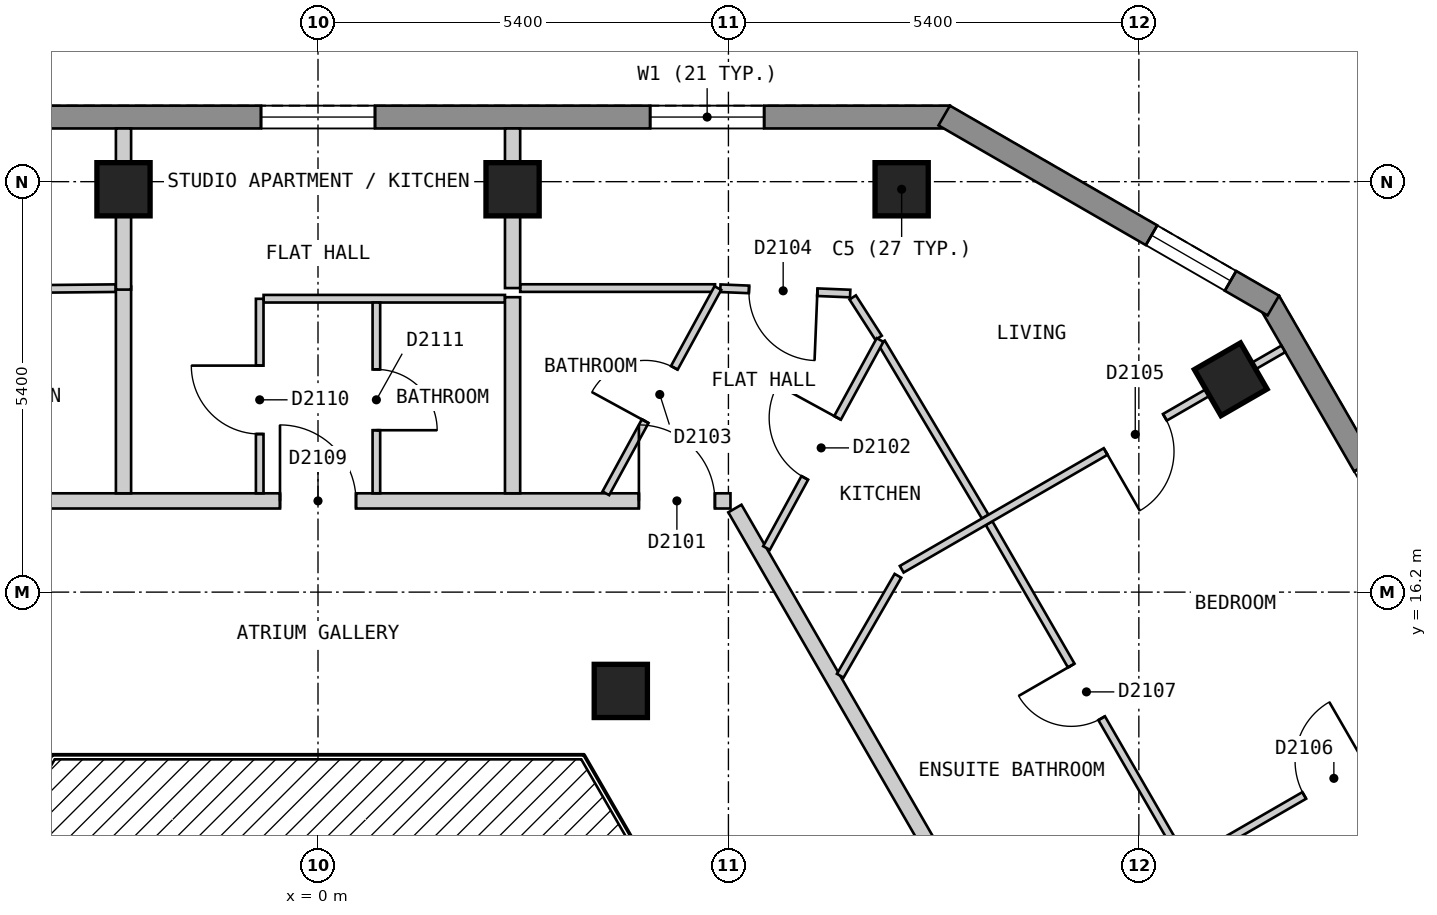
"""IFC4 building model, lengths in metres.
Left out: names, types, materials, properties, quantities, classifications, styles, units other than length and angle.
Written with IfcOpenShell. Run it as: python <this file> out.ifc"""

import sys

from ifc_helpers import new_model, si_unit, direction, frame, frame_2d, origin, origin_2d, place, context, subcontext, project, spatial, polyline, rectangle, outline, extrude, element, fill, save


model = new_model("IFC4")
c1 = context("Model", 3, precision=1e-05, world=origin(), true_north=direction((0.0, 1.0)))
c2 = subcontext(c1, "Body", "Model", "MODEL_VIEW")
j1 = project(units=[si_unit("LENGTHUNIT", "METRE"), si_unit("PLANEANGLEUNIT", "RADIAN")], contexts=[c1])
p1 = place(None, origin())
s1 = spatial("IfcSite", under=j1, at=p1, CompositionType="ELEMENT")
p2 = place(p1, origin())
s2 = spatial("IfcBuilding", under=s1, at=p2, CompositionType="ELEMENT")
p3 = place(p2, frame((0.0, 0.0, 217.8)))
s3 = spatial("IfcBuildingStorey", under=s2, at=p3, CompositionType="ELEMENT", Elevation=217.8)
for number, where, z_axis, x_axis in (
    (1, (7.679, 21.5, 0.0), (0.0, 0.0, 1.0), (-1.0, 0.0, 0.0)),
    (2, (2.56, 21.5, 0.0), (0.0, 0.0, 1.0), (-1.0, 0.0, 0.0)),
    (3, (-2.559, 21.5, 0.0), (0.0, 0.0, 1.0), (-1.0, 0.0, 0.0)),
    (4, (12.009, 19.0, 0.0), (0.0, 0.0, 1.0), (-0.5, 0.866, 0.0)),
    (5, (3.984, 14.9, 0.0), (0.0, 0.0, 1.0), (1.0, 0.0, 0.0)),
):
    element("IfcColumn", number, at=place(p3, frame(where, z_axis=z_axis, x_axis=x_axis)), inside=s3, PredefinedType="COLUMN", context=c2, shape_type="SweptSolid", body=[
        extrude(rectangle(XDim=0.7, YDim=0.7, at=origin_2d()), origin(), (0.0, 0.0, 1.0), 3.0),
    ])
p4 = place(p3, frame((8.314, 22.45, 0.0), z_axis=(0.0, 0.0, 1.0), x_axis=(-1.0, 0.0, 0.0)))
e6 = element("IfcWall", 6, at=p4, inside=s3, PredefinedType="SOLIDWALL", context=c2, shape_type="SweptSolid", body=[
    extrude(outline(polyline([(0.0, -0.15), (16.628, -0.15), (16.548, 0.15), (0.08, 0.15), (0.0, -0.15)])), origin(), (0.0, 0.0, 1.0), 2.7),
])
p5 = place(p4, frame((2.444, 0.0, 0.15)))
e7 = element("IfcOpeningElement", 7, at=p5, cuts=e6, PredefinedType="OPENING", context=c2, shape_type="SweptSolid", body=[
    extrude(rectangle(XDim=1.5, YDim=2.1, at=frame_2d((0.75, 1.05))), frame((0.0, 0.16, 0.0), z_axis=(0.0, -1.0, 0.0), x_axis=(1.0, 0.0, 0.0)), (0.0, 0.0, 1.0), 0.32),
])
p6 = place(p4, frame((7.564, 0.0, 0.15)))
e8 = element("IfcOpeningElement", 8, at=p6, cuts=e6, PredefinedType="OPENING", context=c2, shape_type="SweptSolid", body=[
    extrude(rectangle(XDim=1.5, YDim=2.1, at=frame_2d((0.75, 1.05))), frame((0.0, 0.16, 0.0), z_axis=(0.0, -1.0, 0.0), x_axis=(1.0, 0.0, 0.0)), (0.0, 0.0, 1.0), 0.32),
])
p7 = place(p4, frame((12.683, 0.0, 0.15)))
e9 = element("IfcOpeningElement", 9, at=p7, cuts=e6, PredefinedType="OPENING", context=c2, shape_type="SweptSolid", body=[
    extrude(rectangle(XDim=1.5, YDim=2.1, at=frame_2d((0.75, 1.05))), frame((0.0, 0.16, 0.0), z_axis=(0.0, -1.0, 0.0), x_axis=(1.0, 0.0, 0.0)), (0.0, 0.0, 1.0), 0.32),
])
p8 = place(p3, frame((23.599, 0.825, 0.0), z_axis=(0.0, 0.0, 1.0), x_axis=(-0.500003656944, 0.866023292436, 0.0)))
e10 = element("IfcWall", 10, at=p8, inside=s3, PredefinedType="SOLIDWALL", context=c2, shape_type="SweptSolid", body=[
    extrude(outline(polyline([(0.0, -0.15), (22.17, -0.15), (22.09, 0.15), (0.08, 0.15), (0.0, -0.15)])), origin(), (0.0, 0.0, 1.0), 2.7),
])
p9 = place(p8, frame((2.497, 0.0, 0.15)))
e11 = element("IfcOpeningElement", 11, at=p9, cuts=e10, PredefinedType="OPENING", context=c2, shape_type="SweptSolid", body=[
    extrude(rectangle(XDim=1.5, YDim=2.1, at=frame_2d((0.75, 1.05))), frame((0.0, 0.16, 0.0), z_axis=(0.0, -1.0, 0.0), x_axis=(1.0, 0.0, 0.0)), (0.0, 0.0, 1.0), 0.32),
])
p10 = place(p8, frame((7.723, 0.0, 0.15)))
e12 = element("IfcOpeningElement", 12, at=p10, cuts=e10, PredefinedType="OPENING", context=c2, shape_type="SweptSolid", body=[
    extrude(rectangle(XDim=1.5, YDim=2.1, at=frame_2d((0.75, 1.05))), frame((0.0, 0.16, 0.0), z_axis=(0.0, -1.0, 0.0), x_axis=(1.0, 0.0, 0.0)), (0.0, 0.0, 1.0), 0.32),
])
p11 = place(p8, frame((12.948, 0.0, 0.15)))
e13 = element("IfcOpeningElement", 13, at=p11, cuts=e10, PredefinedType="OPENING", context=c2, shape_type="SweptSolid", body=[
    extrude(rectangle(XDim=1.5, YDim=2.1, at=frame_2d((0.75, 1.05))), frame((0.0, 0.16, 0.0), z_axis=(0.0, -1.0, 0.0), x_axis=(1.0, 0.0, 0.0)), (0.0, 0.0, 1.0), 0.32),
])
p12 = place(p8, frame((18.173, 0.0, 0.15)))
e14 = element("IfcOpeningElement", 14, at=p12, cuts=e10, PredefinedType="OPENING", context=c2, shape_type="SweptSolid", body=[
    extrude(rectangle(XDim=1.5, YDim=2.1, at=frame_2d((0.75, 1.05))), frame((0.0, 0.16, 0.0), z_axis=(0.0, -1.0, 0.0), x_axis=(1.0, 0.0, 0.0)), (0.0, 0.0, 1.0), 0.32),
])
p13 = place(p3, frame((12.569, 19.97, 0.0), z_axis=(0.0, 0.0, 1.0), x_axis=(-0.866022959057, 0.500004234368, 0.0)))
e15 = element("IfcWall", 15, at=p13, inside=s3, PredefinedType="SOLIDWALL", context=c2, shape_type="SweptSolid", body=[
    extrude(outline(polyline([(0.0, -0.15), (5.0, -0.15), (4.92, 0.15), (0.08, 0.15), (0.0, -0.15)])), origin(), (0.0, 0.0, 1.0), 2.7),
])
p14 = place(p13, frame((0.65, 0.0, 0.15)))
e16 = element("IfcOpeningElement", 16, at=p14, cuts=e15, PredefinedType="OPENING", context=c2, shape_type="SweptSolid", body=[
    extrude(rectangle(XDim=1.2, YDim=2.1, at=frame_2d((0.6, 1.05))), frame((0.0, 0.16, 0.0), z_axis=(0.0, -1.0, 0.0), x_axis=(1.0, 0.0, 0.0)), (0.0, 0.0, 1.0), 0.32),
])
p15 = place(p3, frame((5.485, 17.3, 0.0), z_axis=(0.0, 0.0, 1.0), x_axis=(0.499943285704, -0.866058145322, 0.0)))
e17 = element("IfcWall", 17, at=p15, inside=s3, PredefinedType="PARTITIONING", context=c2, shape_type="SweptSolid", body=[
    extrude(rectangle(XDim=10.623, YDim=0.2, at=frame_2d((5.312, 0.0))), origin(), (0.0, 0.0, 1.0), 2.7),
])
p16 = place(p3, frame((-5.312, 17.4, 0.0), z_axis=(0.0, 0.0, 1.0), x_axis=(1.0, 0.0, 0.0)))
e18 = element("IfcWall", 18, at=p16, inside=s3, PredefinedType="PARTITIONING", context=c2, shape_type="SweptSolid", body=[
    extrude(rectangle(XDim=10.739, YDim=0.2, at=frame_2d((5.37, 0.0))), origin(), (0.0, 0.0, 1.0), 2.7),
])
p17 = place(p16, frame((9.534, 0.0, 0.0)))
e19 = element("IfcOpeningElement", 19, at=p17, cuts=e18, PredefinedType="OPENING", context=c2, shape_type="SweptSolid", body=[
    extrude(rectangle(XDim=1.0, YDim=2.1, at=frame_2d((0.5, 1.05))), frame((0.0, 0.11, 0.0), z_axis=(0.0, -1.0, 0.0), x_axis=(1.0, 0.0, 0.0)), (0.0, 0.0, 1.0), 0.22),
])
p18 = place(p16, frame((4.812, 0.0, 0.0)))
e20 = element("IfcOpeningElement", 20, at=p18, cuts=e18, PredefinedType="OPENING", context=c2, shape_type="SweptSolid", body=[
    extrude(rectangle(XDim=1.0, YDim=2.1, at=frame_2d((0.5, 1.05))), frame((0.0, 0.11, 0.0), z_axis=(0.0, -1.0, 0.0), x_axis=(1.0, 0.0, 0.0)), (0.0, 0.0, 1.0), 0.22),
])
p19 = place(p3, frame((7.035, 20.077, 0.0), z_axis=(0.0, 0.0, 1.0), x_axis=(0.540425167977, -0.841392083286, 0.0)))
e21 = element("IfcWall", 21, at=p19, inside=s3, PredefinedType="PARTITIONING", context=c2, shape_type="SweptSolid", body=[
    extrude(rectangle(XDim=0.631, YDim=0.1, at=frame_2d((0.315, 0.0))), origin(), (0.0, 0.0, 1.0), 2.7),
])
p20 = place(p3, frame((7.414, 19.484, 0.0), z_axis=(0.0, 0.0, 1.0), x_axis=(0.511881371655, -0.859056145634, 0.0)))
e22 = element("IfcWall", 22, at=p20, inside=s3, PredefinedType="PARTITIONING", context=c2, shape_type="SweptSolid", body=[
    extrude(rectangle(XDim=2.667, YDim=0.1, at=frame_2d((1.333, 0.0))), origin(), (0.0, 0.0, 1.0), 2.7),
])
p21 = place(p3, frame((8.829, 17.107, 0.0), z_axis=(0.0, 0.0, 1.0), x_axis=(0.500022055211, -0.866012669828, 0.0)))
e23 = element("IfcWall", 23, at=p21, inside=s3, PredefinedType="PARTITIONING", context=c2, shape_type="SweptSolid", body=[
    extrude(rectangle(XDim=5.126, YDim=0.1, at=frame_2d((2.563, 0.0))), origin(), (0.0, 0.0, 1.0), 2.7),
])
p22 = place(p21, frame((2.163, 0.0, 0.0)))
e24 = element("IfcOpeningElement", 24, at=p22, cuts=e23, PredefinedType="OPENING", context=c2, shape_type="SweptSolid", body=[
    extrude(rectangle(XDim=0.8, YDim=2.1, at=frame_2d((0.4, 1.05))), frame((0.0, 0.06, 0.0), z_axis=(0.0, -1.0, 0.0), x_axis=(1.0, 0.0, 0.0)), (0.0, 0.0, 1.0), 0.12),
])
p23 = place(p3, frame((5.294, 20.198, 0.0), z_axis=(0.0, 0.0, 1.0), x_axis=(0.999159599203, -0.040988965834, 0.0)))
e25 = element("IfcWall", 25, at=p23, inside=s3, PredefinedType="PARTITIONING", context=c2, shape_type="SweptSolid", body=[
    extrude(rectangle(XDim=1.709, YDim=0.1, at=frame_2d((0.855, 0.0))), origin(), (0.0, 0.0, 1.0), 2.7),
])
p24 = place(p23, frame((0.377, 0.0, 0.0)))
e26 = element("IfcOpeningElement", 26, at=p24, cuts=e25, PredefinedType="OPENING", context=c2, shape_type="SweptSolid", body=[
    extrude(rectangle(XDim=0.9, YDim=2.1, at=frame_2d((0.45, 1.05))), frame((0.0, 0.06, 0.0), z_axis=(0.0, -1.0, 0.0), x_axis=(1.0, 0.0, 0.0)), (0.0, 0.0, 1.0), 0.12),
])
p25 = place(p3, frame((-0.716, 20.06, 0.0), z_axis=(0.0, 0.0, 1.0), x_axis=(1.0, 0.0, 0.0)))
e27 = element("IfcWall", 27, at=p25, inside=s3, PredefinedType="PARTITIONING", context=c2, shape_type="SweptSolid", body=[
    extrude(rectangle(XDim=3.176, YDim=0.1, at=frame_2d((1.588, 0.0))), origin(), (0.0, 0.0, 1.0), 2.7),
])
p26 = place(p3, frame((2.66, 20.2, 0.0), z_axis=(0.0, 0.0, 1.0), x_axis=(1.0, 0.0, 0.0)))
e28 = element("IfcWall", 28, at=p26, inside=s3, PredefinedType="PARTITIONING", context=c2, shape_type="SweptSolid", body=[
    extrude(rectangle(XDim=2.564, YDim=0.1, at=frame_2d((1.282, 0.0))), origin(), (0.0, 0.0, 1.0), 2.7),
])
p27 = place(p3, frame((-6.259, 20.164, 0.0), z_axis=(0.0, 0.0, 1.0), x_axis=(0.999952982126, 0.009697089139, 0.0)))
e29 = element("IfcWall", 29, at=p27, inside=s3, PredefinedType="PARTITIONING", context=c2, shape_type="SweptSolid", body=[
    extrude(rectangle(XDim=3.6, YDim=0.1, at=frame_2d((1.8, 0.0))), origin(), (0.0, 0.0, 1.0), 2.7),
])
p28 = place(p3, frame((6.871, 15.1, 0.0), z_axis=(0.0, 0.0, 1.0), x_axis=(0.499805980977, 0.866137391745, 0.0)))
e30 = element("IfcWall", 30, at=p28, inside=s3, PredefinedType="PARTITIONING", context=c2, shape_type="SweptSolid", body=[
    extrude(rectangle(XDim=1.518, YDim=0.1, at=frame_2d((0.759, 0.0))), origin(), (0.0, 0.0, 1.0), 2.7),
])
p29 = place(p3, frame((3.787, 17.5, 0.0), z_axis=(0.0, 0.0, 1.0), x_axis=(0.479146828267, 0.877734764585, 0.0)))
e31 = element("IfcWall", 31, at=p29, inside=s3, PredefinedType="PARTITIONING", context=c2, shape_type="SweptSolid", body=[
    extrude(rectangle(XDim=3.076, YDim=0.1, at=frame_2d((1.538, 0.0))), origin(), (0.0, 0.0, 1.0), 2.7),
])
p30 = place(p29, frame((1.081, 0.0, 0.0)))
e32 = element("IfcOpeningElement", 32, at=p30, cuts=e31, PredefinedType="OPENING", context=c2, shape_type="SweptSolid", body=[
    extrude(rectangle(XDim=0.8, YDim=2.1, at=frame_2d((0.4, 1.05))), frame((0.0, 0.06, 0.0), z_axis=(0.0, -1.0, 0.0), x_axis=(1.0, 0.0, 0.0)), (0.0, 0.0, 1.0), 0.12),
])
p31 = place(p3, frame((5.901, 16.78, 0.0), z_axis=(0.0, 0.0, 1.0), x_axis=(0.479148317257, 0.877733951759, 0.0)))
e33 = element("IfcWall", 33, at=p31, inside=s3, PredefinedType="PARTITIONING", context=c2, shape_type="SweptSolid", body=[
    extrude(rectangle(XDim=3.118, YDim=0.1, at=frame_2d((1.559, 0.0))), origin(), (0.0, 0.0, 1.0), 2.7),
])
p32 = place(p31, frame((1.051, 0.0, 0.0)))
e34 = element("IfcOpeningElement", 34, at=p32, cuts=e33, PredefinedType="OPENING", context=c2, shape_type="SweptSolid", body=[
    extrude(rectangle(XDim=0.9, YDim=2.1, at=frame_2d((0.45, 1.05))), frame((0.0, 0.06, 0.0), z_axis=(0.0, -1.0, 0.0), x_axis=(1.0, 0.0, 0.0)), (0.0, 0.0, 1.0), 0.12),
])
p33 = place(p3, frame((0.768, 17.5, 0.0), z_axis=(0.0, 0.0, 1.0), x_axis=(0.0, 1.0, 0.0)))
e35 = element("IfcWall", 35, at=p33, inside=s3, PredefinedType="PARTITIONING", context=c2, shape_type="SweptSolid", body=[
    extrude(rectangle(XDim=2.51, YDim=0.1, at=frame_2d((1.255, 0.0))), origin(), (0.0, 0.0, 1.0), 2.7),
])
p34 = place(p33, frame((0.83, 0.0, 0.0)))
e36 = element("IfcOpeningElement", 36, at=p34, cuts=e35, PredefinedType="OPENING", context=c2, shape_type="SweptSolid", body=[
    extrude(rectangle(XDim=0.8, YDim=2.1, at=frame_2d((0.4, 1.05))), frame((0.0, 0.06, 0.0), z_axis=(0.0, -1.0, 0.0), x_axis=(1.0, 0.0, 0.0)), (0.0, 0.0, 1.0), 0.12),
])
p35 = place(p3, frame((-0.767, 17.5, 0.0), z_axis=(0.0, 0.0, 1.0), x_axis=(0.0, 1.0, 0.0)))
e37 = element("IfcWall", 37, at=p35, inside=s3, PredefinedType="PARTITIONING", context=c2, shape_type="SweptSolid", body=[
    extrude(rectangle(XDim=2.559, YDim=0.1, at=frame_2d((1.28, 0.0))), origin(), (0.0, 0.0, 1.0), 2.7),
])
p36 = place(p35, frame((0.78, 0.0, 0.0)))
e38 = element("IfcOpeningElement", 38, at=p36, cuts=e37, PredefinedType="OPENING", context=c2, shape_type="SweptSolid", body=[
    extrude(rectangle(XDim=0.9, YDim=2.1, at=frame_2d((0.45, 1.05))), frame((0.0, 0.06, 0.0), z_axis=(0.0, -1.0, 0.0), x_axis=(1.0, 0.0, 0.0)), (0.0, 0.0, 1.0), 0.12),
])
p37 = place(p3, frame((9.079, 11.275, 0.0), z_axis=(0.0, 0.0, 1.0), x_axis=(0.866001485781, 0.500041424909, 0.0)))
e39 = element("IfcWall", 39, at=p37, inside=s3, PredefinedType="PARTITIONING", context=c2, shape_type="SweptSolid", body=[
    extrude(rectangle(XDim=7.2, YDim=0.1, at=frame_2d((3.6, 0.0))), origin(), (0.0, 0.0, 1.0), 2.7),
])
p38 = place(p37, frame((4.5, 0.0, 0.0)))
e40 = element("IfcOpeningElement", 40, at=p38, cuts=e39, PredefinedType="OPENING", context=c2, shape_type="SweptSolid", body=[
    extrude(rectangle(XDim=0.9, YDim=2.1, at=frame_2d((0.45, 1.05))), frame((0.0, 0.06, 0.0), z_axis=(0.0, -1.0, 0.0), x_axis=(1.0, 0.0, 0.0)), (0.0, 0.0, 1.0), 0.12),
])
p39 = place(p3, frame((7.68, 16.501, 0.0), z_axis=(0.0, 0.0, 1.0), x_axis=(0.86602149507, 0.500006770031, 0.0)))
e41 = element("IfcWall", 41, at=p39, inside=s3, PredefinedType="PARTITIONING", context=c2, shape_type="SweptSolid", body=[
    extrude(rectangle(XDim=5.798, YDim=0.1, at=frame_2d((2.899, 0.0))), origin(), (0.0, 0.0, 1.0), 2.7),
])
p40 = place(p39, frame((3.098, 0.0, 0.0)))
e42 = element("IfcOpeningElement", 42, at=p40, cuts=e41, PredefinedType="OPENING", context=c2, shape_type="SweptSolid", body=[
    extrude(rectangle(XDim=0.9, YDim=2.1, at=frame_2d((0.45, 1.05))), frame((0.0, 0.06, 0.0), z_axis=(0.0, -1.0, 0.0), x_axis=(1.0, 0.0, 0.0)), (0.0, 0.0, 1.0), 0.12),
])
p41 = place(p3, frame((-2.559, 20.22, 0.0), z_axis=(0.0, 0.0, 1.0), x_axis=(0.0, -1.0, 0.0)))
e43 = element("IfcWall", 43, at=p41, inside=s3, PredefinedType="PARTITIONING", context=c2, shape_type="SweptSolid", body=[
    extrude(rectangle(XDim=2.72, YDim=0.2, at=frame_2d((1.36, 0.0))), origin(), (0.0, 0.0, 1.0), 2.7),
])
p42 = place(p3, frame((2.56, 20.08, 0.0), z_axis=(0.0, 0.0, 1.0), x_axis=(0.0, -1.0, 0.0)))
e44 = element("IfcWall", 44, at=p42, inside=s3, PredefinedType="PARTITIONING", context=c2, shape_type="SweptSolid", body=[
    extrude(rectangle(XDim=2.58, YDim=0.2, at=frame_2d((1.29, 0.0))), origin(), (0.0, 0.0, 1.0), 2.7),
])
p43 = place(p3, frame((2.56, 20.2, 0.0), z_axis=(0.0, 0.0, 1.0), x_axis=(0.0, 1.0, 0.0)))
e45 = element("IfcWall", 45, at=p43, inside=s3, PredefinedType="PARTITIONING", context=c2, shape_type="SweptSolid", body=[
    extrude(rectangle(XDim=2.1, YDim=0.2, at=frame_2d((1.05, 0.0))), origin(), (0.0, 0.0, 1.0), 2.7),
])
p44 = place(p3, frame((-2.559, 20.18, 0.0), z_axis=(0.0, 0.0, 1.0), x_axis=(0.0, 1.0, 0.0)))
e46 = element("IfcWall", 46, at=p44, inside=s3, PredefinedType="PARTITIONING", context=c2, shape_type="SweptSolid", body=[
    extrude(rectangle(XDim=2.12, YDim=0.2, at=frame_2d((1.06, 0.0))), origin(), (0.0, 0.0, 1.0), 2.7),
])
p45 = place(p5, origin())
e47 = element("IfcWindow", 47, at=p45, inside=s3, PartitioningType="SINGLE_PANEL", PredefinedType="WINDOW", context=c2, shape_type="SweptSolid", body=[
    extrude(rectangle(XDim=1.5, YDim=2.1, at=frame_2d((0.75, 1.05))), frame((0.0, 0.03, 0.0), z_axis=(0.0, -1.0, 0.0), x_axis=(1.0, 0.0, 0.0)), (0.0, 0.0, 1.0), 0.06),
])
fill(e7, e47)
p46 = place(p6, origin())
e48 = element("IfcWindow", 48, at=p46, inside=s3, PartitioningType="SINGLE_PANEL", PredefinedType="WINDOW", context=c2, shape_type="SweptSolid", body=[
    extrude(rectangle(XDim=1.5, YDim=2.1, at=frame_2d((0.75, 1.05))), frame((0.0, 0.03, 0.0), z_axis=(0.0, -1.0, 0.0), x_axis=(1.0, 0.0, 0.0)), (0.0, 0.0, 1.0), 0.06),
])
fill(e8, e48)
p47 = place(p14, origin())
e49 = element("IfcWindow", 49, at=p47, inside=s3, PartitioningType="SINGLE_PANEL", PredefinedType="WINDOW", context=c2, shape_type="SweptSolid", body=[
    extrude(rectangle(XDim=1.2, YDim=2.1, at=frame_2d((0.6, 1.05))), frame((0.0, 0.03, 0.0), z_axis=(0.0, -1.0, 0.0), x_axis=(1.0, 0.0, 0.0)), (0.0, 0.0, 1.0), 0.06),
])
fill(e16, e49)
p48 = place(p17, origin())
e50 = element("IfcDoor", 50, at=p48, inside=s3, OperationType="SINGLE_SWING_LEFT", PredefinedType="DOOR", context=c2, shape_type="SweptSolid", body=[
    extrude(rectangle(XDim=1.0, YDim=2.1, at=frame_2d((0.5, 1.05))), frame((0.0, 0.025, 0.0), z_axis=(0.0, -1.0, 0.0), x_axis=(1.0, 0.0, 0.0)), (0.0, 0.0, 1.0), 0.05),
])
fill(e19, e50)
p49 = place(p32, origin())
e51 = element("IfcDoor", 51, at=p49, inside=s3, OperationType="SINGLE_SWING_RIGHT", PredefinedType="DOOR", context=c2, shape_type="SweptSolid", body=[
    extrude(rectangle(XDim=0.9, YDim=2.1, at=frame_2d((0.45, 1.05))), frame((0.0, 0.025, 0.0), z_axis=(0.0, -1.0, 0.0), x_axis=(1.0, 0.0, 0.0)), (0.0, 0.0, 1.0), 0.05),
])
fill(e34, e51)
p50 = place(p30, origin())
e52 = element("IfcDoor", 52, at=p50, inside=s3, OperationType="SINGLE_SWING_LEFT", PredefinedType="DOOR", context=c2, shape_type="SweptSolid", body=[
    extrude(rectangle(XDim=0.8, YDim=2.1, at=frame_2d((0.4, 1.05))), frame((0.0, 0.025, 0.0), z_axis=(0.0, -1.0, 0.0), x_axis=(1.0, 0.0, 0.0)), (0.0, 0.0, 1.0), 0.05),
])
fill(e32, e52)
p51 = place(p24, origin())
e53 = element("IfcDoor", 53, at=p51, inside=s3, OperationType="SINGLE_SWING_RIGHT", PredefinedType="DOOR", context=c2, shape_type="SweptSolid", body=[
    extrude(rectangle(XDim=0.9, YDim=2.1, at=frame_2d((0.45, 1.05))), frame((0.0, 0.025, 0.0), z_axis=(0.0, -1.0, 0.0), x_axis=(1.0, 0.0, 0.0)), (0.0, 0.0, 1.0), 0.05),
])
fill(e26, e53)
p52 = place(p40, origin())
e54 = element("IfcDoor", 54, at=p52, inside=s3, OperationType="SINGLE_SWING_LEFT", PredefinedType="DOOR", context=c2, shape_type="SweptSolid", body=[
    extrude(rectangle(XDim=0.9, YDim=2.1, at=frame_2d((0.45, 1.05))), frame((0.0, 0.025, 0.0), z_axis=(0.0, -1.0, 0.0), x_axis=(1.0, 0.0, 0.0)), (0.0, 0.0, 1.0), 0.05),
])
fill(e42, e54)
p53 = place(p38, origin())
e55 = element("IfcDoor", 55, at=p53, inside=s3, OperationType="SINGLE_SWING_RIGHT", PredefinedType="DOOR", context=c2, shape_type="SweptSolid", body=[
    extrude(rectangle(XDim=0.9, YDim=2.1, at=frame_2d((0.45, 1.05))), frame((0.0, 0.025, 0.0), z_axis=(0.0, -1.0, 0.0), x_axis=(1.0, 0.0, 0.0)), (0.0, 0.0, 1.0), 0.05),
])
fill(e40, e55)
p54 = place(p22, origin())
e56 = element("IfcDoor", 56, at=p54, inside=s3, OperationType="SINGLE_SWING_LEFT", PredefinedType="DOOR", context=c2, shape_type="SweptSolid", body=[
    extrude(rectangle(XDim=0.8, YDim=2.1, at=frame_2d((0.4, 1.05))), frame((0.0, 0.025, 0.0), z_axis=(0.0, -1.0, 0.0), x_axis=(1.0, 0.0, 0.0)), (0.0, 0.0, 1.0), 0.05),
])
fill(e24, e56)
p55 = place(p18, origin())
e57 = element("IfcDoor", 57, at=p55, inside=s3, OperationType="SINGLE_SWING_LEFT", PredefinedType="DOOR", context=c2, shape_type="SweptSolid", body=[
    extrude(rectangle(XDim=1.0, YDim=2.1, at=frame_2d((0.5, 1.05))), frame((0.0, 0.025, 0.0), z_axis=(0.0, -1.0, 0.0), x_axis=(1.0, 0.0, 0.0)), (0.0, 0.0, 1.0), 0.05),
])
fill(e20, e57)
p56 = place(p36, origin())
e58 = element("IfcDoor", 58, at=p56, inside=s3, OperationType="SINGLE_SWING_RIGHT", PredefinedType="DOOR", context=c2, shape_type="SweptSolid", body=[
    extrude(rectangle(XDim=0.9, YDim=2.1, at=frame_2d((0.45, 1.05))), frame((0.0, 0.025, 0.0), z_axis=(0.0, -1.0, 0.0), x_axis=(1.0, 0.0, 0.0)), (0.0, 0.0, 1.0), 0.05),
])
fill(e38, e58)
p57 = place(p34, origin())
e59 = element("IfcDoor", 59, at=p57, inside=s3, OperationType="SINGLE_SWING_LEFT", PredefinedType="DOOR", context=c2, shape_type="SweptSolid", body=[
    extrude(rectangle(XDim=0.8, YDim=2.1, at=frame_2d((0.4, 1.05))), frame((0.0, 0.025, 0.0), z_axis=(0.0, -1.0, 0.0), x_axis=(1.0, 0.0, 0.0)), (0.0, 0.0, 1.0), 0.05),
])
fill(e36, e59)
save(model, sys.argv[1])
